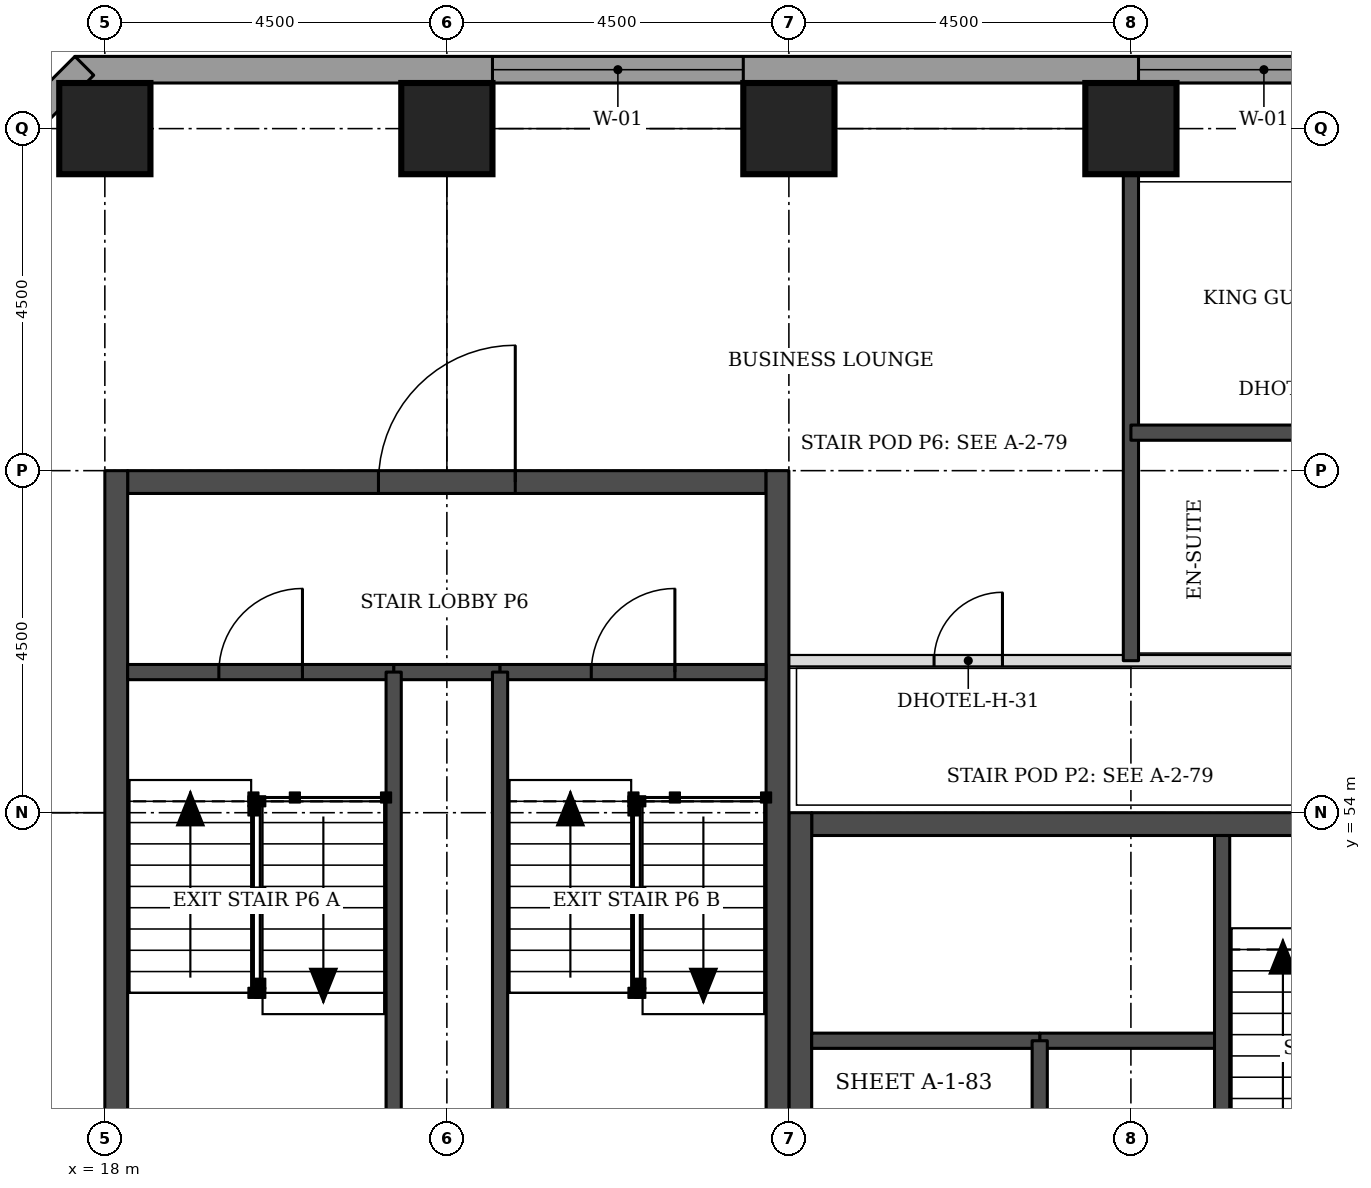
"""IFC4 building model, lengths in metres.
Left out: names, types, materials, properties, quantities, classifications, styles, units other than length and angle.
Written with IfcOpenShell. Run it as: python <this file> out.ifc"""

import sys

from ifc_helpers import new_model, si_unit, direction, frame, frame_2d, origin, origin_2d, place, context, subcontext, project, spatial, rectangle, extrude, element, fill, save


model = new_model("IFC4")
c1 = context("Model", 3, precision=1e-05, world=origin(), true_north=direction((0.0, 1.0)))
c2 = subcontext(c1, "Body", "Model", "MODEL_VIEW")
j1 = project(units=[si_unit("LENGTHUNIT", "METRE"), si_unit("PLANEANGLEUNIT", "RADIAN")], contexts=[c1])
p1 = place(None, origin())
s1 = spatial("IfcSite", under=j1, at=p1, CompositionType="ELEMENT")
p2 = place(p1, origin())
s2 = spatial("IfcBuilding", under=s1, at=p2, CompositionType="ELEMENT")
p3 = place(p2, frame((0.0, 0.0, 46.2)))
s3 = spatial("IfcBuildingStorey", under=s2, at=p3, CompositionType="ELEMENT", Elevation=46.2)
for number, where, z_axis, x_axis in (
    (1, (18.0, 63.0, 0.0), (0.0, 0.0, 1.0), (1.0, 0.0, 0.0)),
    (2, (22.5, 63.0, 0.0), (0.0, 0.0, 1.0), (1.0, 0.0, 0.0)),
    (3, (27.0, 63.0, 0.0), (0.0, 0.0, 1.0), (1.0, 0.0, 0.0)),
    (4, (31.5, 63.0, 0.0), (0.0, 0.0, 1.0), (1.0, 0.0, 0.0)),
):
    element("IfcColumn", number, at=place(p3, frame(where, z_axis=z_axis, x_axis=x_axis)), inside=s3, PredefinedType="COLUMN", context=c2, shape_type="SweptSolid", body=[
        extrude(rectangle(XDim=1.2, YDim=1.2, at=origin_2d()), origin(), (0.0, 0.0, 1.0), 3.3),
    ])
p4 = place(p3, frame((27.3, 53.85, 0.0), z_axis=(0.0, 0.0, 1.0), x_axis=(1.0, 0.0, 0.0)))
e5 = element("IfcWall", 5, at=p4, inside=s3, PredefinedType="SHEAR", context=c2, shape_type="SweptSolid", body=[
    extrude(rectangle(XDim=8.4, YDim=0.3, at=frame_2d((4.2, 0.0))), origin(), (0.0, 0.0, 1.0), 3.3),
])
p5 = place(p4, frame((6.4, 0.0, 0.0)))
e6 = element("IfcOpeningElement", 6, at=p5, cuts=e5, PredefinedType="OPENING", context=c2, shape_type="SweptSolid", body=[
    extrude(rectangle(XDim=1.1, YDim=2.1, at=frame_2d((0.55, 1.05))), frame((0.0, 0.16, 0.0), z_axis=(0.0, -1.0, 0.0), x_axis=(1.0, 0.0, 0.0)), (0.0, 0.0, 1.0), 0.32),
])
p6 = place(p3, frame((27.15, 45.0, 0.0), z_axis=(0.0, 0.0, 1.0), x_axis=(0.0, 1.0, 0.0)))
e7 = element("IfcWall", 7, at=p6, inside=s3, PredefinedType="SHEAR", context=c2, shape_type="SweptSolid", body=[
    extrude(rectangle(XDim=9.0, YDim=0.3, at=frame_2d((4.5, 0.0))), origin(), (0.0, 0.0, 1.0), 3.3),
])
p7 = place(p6, frame((0.4, 0.0, 0.0)))
e8 = element("IfcOpeningElement", 8, at=p7, cuts=e7, PredefinedType="OPENING", context=c2, shape_type="SweptSolid", body=[
    extrude(rectangle(XDim=1.1, YDim=2.1, at=frame_2d((0.55, 1.05))), frame((0.0, 0.16, 0.0), z_axis=(0.0, -1.0, 0.0), x_axis=(1.0, 0.0, 0.0)), (0.0, 0.0, 1.0), 0.32),
])
p8 = place(p3, frame((18.3, 58.35, 0.0), z_axis=(0.0, 0.0, 1.0), x_axis=(1.0, 0.0, 0.0)))
e9 = element("IfcWall", 9, at=p8, inside=s3, PredefinedType="SHEAR", context=c2, shape_type="SweptSolid", body=[
    extrude(rectangle(XDim=8.4, YDim=0.3, at=frame_2d((4.2, 0.0))), origin(), (0.0, 0.0, 1.0), 3.3),
])
p9 = place(p8, frame((3.3, 0.0, 0.0)))
e10 = element("IfcOpeningElement", 10, at=p9, cuts=e9, PredefinedType="OPENING", context=c2, shape_type="SweptSolid", body=[
    extrude(rectangle(XDim=1.8, YDim=2.1, at=frame_2d((0.9, 1.05))), frame((0.0, 0.16, 0.0), z_axis=(0.0, -1.0, 0.0), x_axis=(1.0, 0.0, 0.0)), (0.0, 0.0, 1.0), 0.32),
])
for number, where, z_axis, x_axis in (
    (11, (18.15, 49.5, 0.0), (0.0, 0.0, 1.0), (0.0, 1.0, 0.0)),
    (12, (26.85, 49.5, 0.0), (0.0, 0.0, 1.0), (0.0, 1.0, 0.0)),
):
    element("IfcWall", number, at=place(p3, frame(where, z_axis=z_axis, x_axis=x_axis)), inside=s3, PredefinedType="SHEAR", context=c2, shape_type="SweptSolid", body=[
        extrude(rectangle(XDim=9.0, YDim=0.3, at=frame_2d((4.5, 0.0))), origin(), (0.0, 0.0, 1.0), 3.3),
    ])
p10 = place(p3, frame((35.4, 63.775, 0.0), z_axis=(0.0, 0.0, 1.0), x_axis=(-1.0, 0.0, 0.0)))
e13 = element("IfcWall", 13, at=p10, inside=s3, PredefinedType="STANDARD", context=c2, shape_type="SweptSolid", body=[
    extrude(rectangle(XDim=17.793, YDim=0.35, at=frame_2d((8.897, 0.0))), origin(), (0.0, 0.0, 1.0), 3.055),
])
p11 = place(p10, frame((0.5, 0.0, 0.8)))
e14 = element("IfcOpeningElement", 14, at=p11, cuts=e13, PredefinedType="OPENING", context=c2, shape_type="SweptSolid", body=[
    extrude(rectangle(XDim=3.3, YDim=1.5, at=frame_2d((1.65, 0.75))), frame((0.0, 0.185, 0.0), z_axis=(0.0, -1.0, 0.0), x_axis=(1.0, 0.0, 0.0)), (0.0, 0.0, 1.0), 0.37),
])
p12 = place(p10, frame((9.0, 0.0, 0.8)))
e15 = element("IfcOpeningElement", 15, at=p12, cuts=e13, PredefinedType="OPENING", context=c2, shape_type="SweptSolid", body=[
    extrude(rectangle(XDim=3.3, YDim=1.5, at=frame_2d((1.65, 0.75))), frame((0.0, 0.185, 0.0), z_axis=(0.0, -1.0, 0.0), x_axis=(1.0, 0.0, 0.0)), (0.0, 0.0, 1.0), 0.37),
])
p13 = place(p3, frame((17.73, 63.826, 0.0), z_axis=(0.0, 0.0, 1.0), x_axis=(-0.707106781187, -0.707106781187, 0.0)))
e16 = element("IfcWall", 16, at=p13, inside=s3, PredefinedType="STANDARD", context=c2, shape_type="SweptSolid", body=[
    extrude(rectangle(XDim=7.151, YDim=0.35, at=frame_2d((3.576, 0.0))), origin(), (0.0, 0.0, 1.0), 3.055),
])
p14 = place(p13, frame((1.926, 0.0, 0.8)))
e17 = element("IfcOpeningElement", 17, at=p14, cuts=e16, PredefinedType="OPENING", context=c2, shape_type="SweptSolid", body=[
    extrude(rectangle(XDim=3.3, YDim=1.5, at=frame_2d((1.65, 0.75))), frame((0.0, 0.185, 0.0), z_axis=(0.0, -1.0, 0.0), x_axis=(1.0, 0.0, 0.0)), (0.0, 0.0, 1.0), 0.37),
])
p15 = place(p3, frame((27.0, 56.0, 0.0), z_axis=(0.0, 0.0, 1.0), x_axis=(1.0, 0.0, 0.0)))
e18 = element("IfcWall", 18, at=p15, inside=s3, PredefinedType="PARTITIONING", context=c2, shape_type="SweptSolid", body=[
    extrude(rectangle(XDim=16.0, YDim=0.15, at=frame_2d((8.0, 0.0))), origin(), (0.0, 0.0, 1.0), 3.08),
])
p16 = place(p15, frame((7.425, 0.0, 0.0)))
e19 = element("IfcOpeningElement", 19, at=p16, cuts=e18, PredefinedType="OPENING", context=c2, shape_type="SweptSolid", body=[
    extrude(rectangle(XDim=1.0, YDim=2.1, at=frame_2d((0.5, 1.05))), frame((0.0, 0.085, 0.0), z_axis=(0.0, -1.0, 0.0), x_axis=(1.0, 0.0, 0.0)), (0.0, 0.0, 1.0), 0.17),
])
p17 = place(p15, frame((1.91, 0.0, 0.0)))
e20 = element("IfcOpeningElement", 20, at=p17, cuts=e18, PredefinedType="OPENING", context=c2, shape_type="SweptSolid", body=[
    extrude(rectangle(XDim=0.9, YDim=2.1, at=frame_2d((0.45, 1.05))), frame((0.0, 0.085, 0.0), z_axis=(0.0, -1.0, 0.0), x_axis=(1.0, 0.0, 0.0)), (0.0, 0.0, 1.0), 0.17),
])
p18 = place(p3, frame((31.5, 56.0, 0.0), z_axis=(0.0, 0.0, 1.0), x_axis=(0.0, 1.0, 0.0)))
e21 = element("IfcWall", 21, at=p18, inside=s3, PredefinedType="SOLIDWALL", context=c2, shape_type="SweptSolid", body=[
    extrude(rectangle(XDim=6.4, YDim=0.2, at=frame_2d((3.2, 0.0))), origin(), (0.0, 0.0, 1.0), 3.08),
])
p19 = place(p3, frame((31.5, 59.0, 0.0), z_axis=(0.0, 0.0, 1.0), x_axis=(1.0, 0.0, 0.0)))
e22 = element("IfcWall", 22, at=p19, inside=s3, PredefinedType="SOLIDWALL", context=c2, shape_type="SweptSolid", body=[
    extrude(rectangle(XDim=2.35, YDim=0.2, at=frame_2d((1.175, 0.0))), origin(), (0.0, 0.0, 1.0), 3.08),
])
p20 = place(p3, frame((30.3, 51.0, 0.0), z_axis=(0.0, 0.0, 1.0), x_axis=(1.0, 0.0, 0.0)))
e23 = element("IfcWall", 23, at=p20, inside=s3, PredefinedType="SOLIDWALL", context=c2, shape_type="SweptSolid", body=[
    extrude(rectangle(XDim=2.4, YDim=0.2, at=frame_2d((1.2, 0.0))), origin(), (0.0, 0.0, 1.0), 3.3),
])
p21 = place(p3, frame((27.3, 51.0, 0.0), z_axis=(0.0, 0.0, 1.0), x_axis=(1.0, 0.0, 0.0)))
e24 = element("IfcWall", 24, at=p21, inside=s3, PredefinedType="SOLIDWALL", context=c2, shape_type="SweptSolid", body=[
    extrude(rectangle(XDim=3.0, YDim=0.2, at=frame_2d((1.5, 0.0))), origin(), (0.0, 0.0, 1.0), 3.08),
])
for number, where, z_axis, x_axis in (
    (25, (30.3, 45.3, 0.0), (0.0, 0.0, 1.0), (0.0, 1.0, 0.0)),
    (26, (32.7, 48.0, 0.0), (0.0, 0.0, 1.0), (0.0, 1.0, 0.0)),
):
    element("IfcWall", number, at=place(p3, frame(where, z_axis=z_axis, x_axis=x_axis)), inside=s3, PredefinedType="SOLIDWALL", context=c2, shape_type="SweptSolid", body=[
        extrude(rectangle(XDim=5.7, YDim=0.2, at=frame_2d((2.85, 0.0))), origin(), (0.0, 0.0, 1.0), 3.08),
    ])
p22 = place(p3, frame((21.8, 55.85, 0.0), z_axis=(0.0, 0.0, 1.0), x_axis=(1.0, 0.0, 0.0)))
e27 = element("IfcWall", 27, at=p22, inside=s3, PredefinedType="SOLIDWALL", context=c2, shape_type="SweptSolid", body=[
    extrude(rectangle(XDim=1.4, YDim=0.2, at=frame_2d((0.7, 0.0))), origin(), (0.0, 0.0, 1.0), 3.08),
])
p23 = place(p3, frame((18.3, 55.85, 0.0), z_axis=(0.0, 0.0, 1.0), x_axis=(1.0, 0.0, 0.0)))
e28 = element("IfcWall", 28, at=p23, inside=s3, PredefinedType="SOLIDWALL", context=c2, shape_type="SweptSolid", body=[
    extrude(rectangle(XDim=3.5, YDim=0.2, at=frame_2d((1.75, 0.0))), origin(), (0.0, 0.0, 1.0), 3.08),
])
p24 = place(p23, frame((1.2, 0.0, 0.0)))
e29 = element("IfcOpeningElement", 29, at=p24, cuts=e28, PredefinedType="OPENING", context=c2, shape_type="SweptSolid", body=[
    extrude(rectangle(XDim=1.1, YDim=2.1, at=frame_2d((0.55, 1.05))), frame((0.0, 0.11, 0.0), z_axis=(0.0, -1.0, 0.0), x_axis=(1.0, 0.0, 0.0)), (0.0, 0.0, 1.0), 0.22),
])
p25 = place(p3, frame((23.2, 55.85, 0.0), z_axis=(0.0, 0.0, 1.0), x_axis=(1.0, 0.0, 0.0)))
e30 = element("IfcWall", 30, at=p25, inside=s3, PredefinedType="SOLIDWALL", context=c2, shape_type="SweptSolid", body=[
    extrude(rectangle(XDim=3.5, YDim=0.2, at=frame_2d((1.75, 0.0))), origin(), (0.0, 0.0, 1.0), 3.08),
])
p26 = place(p25, frame((1.2, 0.0, 0.0)))
e31 = element("IfcOpeningElement", 31, at=p26, cuts=e30, PredefinedType="OPENING", context=c2, shape_type="SweptSolid", body=[
    extrude(rectangle(XDim=1.1, YDim=2.1, at=frame_2d((0.55, 1.05))), frame((0.0, 0.11, 0.0), z_axis=(0.0, -1.0, 0.0), x_axis=(1.0, 0.0, 0.0)), (0.0, 0.0, 1.0), 0.22),
])
for number, where, z_axis, x_axis in (
    (32, (21.8, 49.8, 0.0), (0.0, 0.0, 1.0), (0.0, 1.0, 0.0)),
    (33, (23.2, 49.8, 0.0), (0.0, 0.0, 1.0), (0.0, 1.0, 0.0)),
):
    element("IfcWall", number, at=place(p3, frame(where, z_axis=z_axis, x_axis=x_axis)), inside=s3, PredefinedType="SOLIDWALL", context=c2, shape_type="SweptSolid", body=[
        extrude(rectangle(XDim=6.05, YDim=0.2, at=frame_2d((3.025, 0.0))), origin(), (0.0, 0.0, 1.0), 3.08),
    ])
p27 = place(p11, origin())
e34 = element("IfcWindow", 34, at=p27, inside=s3, PartitioningType="SINGLE_PANEL", PredefinedType="WINDOW", context=c2, shape_type="SweptSolid", body=[
    extrude(rectangle(XDim=3.3, YDim=1.5, at=frame_2d((1.65, 0.75))), frame((0.0, 0.085, 0.0), z_axis=(0.0, -1.0, 0.0), x_axis=(1.0, 0.0, 0.0)), (0.0, 0.0, 1.0), 0.06),
])
fill(e14, e34)
p28 = place(p12, origin())
e35 = element("IfcWindow", 35, at=p28, inside=s3, PartitioningType="SINGLE_PANEL", PredefinedType="WINDOW", context=c2, shape_type="SweptSolid", body=[
    extrude(rectangle(XDim=3.3, YDim=1.5, at=frame_2d((1.65, 0.75))), frame((0.0, 0.085, 0.0), z_axis=(0.0, -1.0, 0.0), x_axis=(1.0, 0.0, 0.0)), (0.0, 0.0, 1.0), 0.06),
])
fill(e15, e35)
p29 = place(p17, origin())
e36 = element("IfcDoor", 36, at=p29, inside=s3, OperationType="SINGLE_SWING_RIGHT", PredefinedType="DOOR", context=c2, shape_type="SweptSolid", body=[
    extrude(rectangle(XDim=0.9, YDim=2.1, at=frame_2d((0.45, 1.05))), frame((0.0, 0.025, 0.0), z_axis=(0.0, -1.0, 0.0), x_axis=(1.0, 0.0, 0.0)), (0.0, 0.0, 1.0), 0.05),
])
fill(e20, e36)
p30 = place(p24, origin())
e37 = element("IfcDoor", 37, at=p30, inside=s3, OperationType="SINGLE_SWING_RIGHT", PredefinedType="DOOR", context=c2, shape_type="SweptSolid", body=[
    extrude(rectangle(XDim=1.1, YDim=2.1, at=frame_2d((0.55, 1.05))), frame((0.0, 0.025, 0.0), z_axis=(0.0, -1.0, 0.0), x_axis=(1.0, 0.0, 0.0)), (0.0, 0.0, 1.0), 0.05),
])
fill(e29, e37)
p31 = place(p26, origin())
e38 = element("IfcDoor", 38, at=p31, inside=s3, OperationType="SINGLE_SWING_RIGHT", PredefinedType="DOOR", context=c2, shape_type="SweptSolid", body=[
    extrude(rectangle(XDim=1.1, YDim=2.1, at=frame_2d((0.55, 1.05))), frame((0.0, 0.025, 0.0), z_axis=(0.0, -1.0, 0.0), x_axis=(1.0, 0.0, 0.0)), (0.0, 0.0, 1.0), 0.05),
])
fill(e31, e38)
p32 = place(p9, origin())
e39 = element("IfcDoor", 39, at=p32, inside=s3, OperationType="SINGLE_SWING_RIGHT", PredefinedType="DOOR", context=c2, shape_type="SweptSolid", body=[
    extrude(rectangle(XDim=1.8, YDim=2.1, at=frame_2d((0.9, 1.05))), frame((0.0, 0.025, 0.0), z_axis=(0.0, -1.0, 0.0), x_axis=(1.0, 0.0, 0.0)), (0.0, 0.0, 1.0), 0.05),
])
fill(e10, e39)
save(model, sys.argv[1])
